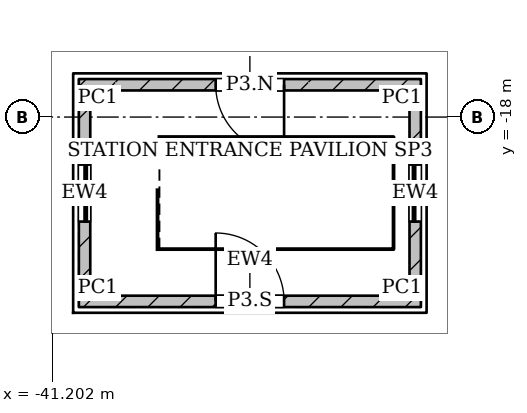
"""IFC4 building model, lengths in metres.
Left out: names, types, materials, properties, quantities, classifications, styles, units other than length and angle.
Written with IfcOpenShell. Run it as: python <this file> out.ifc"""

import sys

from ifc_helpers import new_model, si_unit, direction, frame, frame_2d, origin, origin_2d, place, context, subcontext, project, spatial, rectangle, extrude, element, fill, save


model = new_model("IFC4")
c1 = context("Model", 3, precision=1e-05, world=origin(), true_north=direction((0.0, 1.0)))
c2 = subcontext(c1, "Body", "Model", "MODEL_VIEW")
j1 = project(units=[si_unit("LENGTHUNIT", "METRE"), si_unit("PLANEANGLEUNIT", "RADIAN")], contexts=[c1])
p1 = place(None, origin())
s1 = spatial("IfcSite", under=j1, at=p1, CompositionType="ELEMENT")
p2 = place(p1, origin())
s2 = spatial("IfcBuilding", under=s1, at=p2, CompositionType="ELEMENT")
p3 = place(p2, origin())
s3 = spatial("IfcBuildingStorey", under=s2, at=p3, CompositionType="ELEMENT", Elevation=0.0)
p4 = place(p3, frame((-40.5, -22.85, 0.0), z_axis=(0.0, 0.0, 1.0), x_axis=(1.0, 0.0, 0.0)))
e1 = element("IfcWall", 1, at=p4, inside=s3, PredefinedType="SOLIDWALL", context=c2, shape_type="SweptSolid", body=[
    extrude(rectangle(XDim=9.0, YDim=0.3, at=frame_2d((4.5, 0.0))), origin(), (0.0, 0.0, 1.0), 4.2),
])
p5 = place(p4, frame((3.6, 0.0, 0.0)))
e2 = element("IfcOpeningElement", 2, at=p5, cuts=e1, PredefinedType="OPENING", context=c2, shape_type="SweptSolid", body=[
    extrude(rectangle(XDim=1.8, YDim=2.4, at=frame_2d((0.9, 1.2))), frame((0.0, 0.16, 0.0), z_axis=(0.0, -1.0, 0.0), x_axis=(1.0, 0.0, 0.0)), (0.0, 0.0, 1.0), 0.32),
])
p6 = place(p3, frame((-31.65, -22.7, 0.0), z_axis=(0.0, 0.0, 1.0), x_axis=(0.0, 1.0, 0.0)))
e3 = element("IfcWall", 3, at=p6, inside=s3, PredefinedType="SOLIDWALL", context=c2, shape_type="SweptSolid", body=[
    extrude(rectangle(XDim=5.4, YDim=0.3, at=frame_2d((2.7, 0.0))), origin(), (0.0, 0.0, 1.0), 4.2),
])
p7 = place(p6, frame((1.95, 0.0, 0.9)))
e4 = element("IfcOpeningElement", 4, at=p7, cuts=e3, PredefinedType="OPENING", context=c2, shape_type="SweptSolid", body=[
    extrude(rectangle(XDim=1.5, YDim=1.8, at=frame_2d((0.75, 0.9))), frame((0.0, 0.16, 0.0), z_axis=(0.0, -1.0, 0.0), x_axis=(1.0, 0.0, 0.0)), (0.0, 0.0, 1.0), 0.32),
])
p8 = place(p3, frame((-31.5, -17.15, 0.0), z_axis=(0.0, 0.0, 1.0), x_axis=(-1.0, 0.0, 0.0)))
e5 = element("IfcWall", 5, at=p8, inside=s3, PredefinedType="SOLIDWALL", context=c2, shape_type="SweptSolid", body=[
    extrude(rectangle(XDim=9.0, YDim=0.3, at=frame_2d((4.5, 0.0))), origin(), (0.0, 0.0, 1.0), 4.2),
])
p9 = place(p8, frame((3.6, 0.0, 0.0)))
e6 = element("IfcOpeningElement", 6, at=p9, cuts=e5, PredefinedType="OPENING", context=c2, shape_type="SweptSolid", body=[
    extrude(rectangle(XDim=1.8, YDim=2.4, at=frame_2d((0.9, 1.2))), frame((0.0, 0.16, 0.0), z_axis=(0.0, -1.0, 0.0), x_axis=(1.0, 0.0, 0.0)), (0.0, 0.0, 1.0), 0.32),
])
p10 = place(p3, frame((-40.35, -17.3, 0.0), z_axis=(0.0, 0.0, 1.0), x_axis=(0.0, -1.0, 0.0)))
e7 = element("IfcWall", 7, at=p10, inside=s3, PredefinedType="SOLIDWALL", context=c2, shape_type="SweptSolid", body=[
    extrude(rectangle(XDim=5.4, YDim=0.3, at=frame_2d((2.7, 0.0))), origin(), (0.0, 0.0, 1.0), 4.2),
])
p11 = place(p10, frame((1.95, 0.0, 0.9)))
e8 = element("IfcOpeningElement", 8, at=p11, cuts=e7, PredefinedType="OPENING", context=c2, shape_type="SweptSolid", body=[
    extrude(rectangle(XDim=1.5, YDim=1.8, at=frame_2d((0.75, 0.9))), frame((0.0, 0.16, 0.0), z_axis=(0.0, -1.0, 0.0), x_axis=(1.0, 0.0, 0.0)), (0.0, 0.0, 1.0), 0.32),
])
for number, where, z_axis, x_axis in (
    (9, (-40.0, -22.5, 0.0), (0.0, 0.0, 1.0), (1.0, 0.0, 0.0)),
    (10, (-32.0, -22.5, 0.0), (0.0, 0.0, 1.0), (1.0, 0.0, 0.0)),
    (11, (-32.0, -17.5, 0.0), (0.0, 0.0, 1.0), (1.0, 0.0, 0.0)),
    (12, (-40.0, -17.5, 0.0), (0.0, 0.0, 1.0), (1.0, 0.0, 0.0)),
):
    element("IfcColumn", number, at=place(p3, frame(where, z_axis=z_axis, x_axis=x_axis)), inside=s3, PredefinedType="COLUMN", context=c2, shape_type="SweptSolid", body=[
        extrude(rectangle(XDim=0.4, YDim=0.4, at=origin_2d()), origin(), (0.0, 0.0, 1.0), 4.2),
    ])
p12 = place(p5, origin())
e13 = element("IfcDoor", 13, at=p12, inside=s3, OperationType="DOUBLE_DOOR_DOUBLE_SWING", PredefinedType="DOOR", context=c2, shape_type="SweptSolid", body=[
    extrude(rectangle(XDim=1.8, YDim=2.4, at=frame_2d((0.9, 1.2))), frame((0.0, 0.025, 0.0), z_axis=(0.0, -1.0, 0.0), x_axis=(1.0, 0.0, 0.0)), (0.0, 0.0, 1.0), 0.05),
])
fill(e2, e13)
p13 = place(p7, origin())
e14 = element("IfcWindow", 14, at=p13, inside=s3, PartitioningType="SINGLE_PANEL", PredefinedType="WINDOW", context=c2, shape_type="SweptSolid", body=[
    extrude(rectangle(XDim=1.5, YDim=1.8, at=frame_2d((0.75, 0.9))), frame((0.0, 0.06, 0.0), z_axis=(0.0, -1.0, 0.0), x_axis=(1.0, 0.0, 0.0)), (0.0, 0.0, 1.0), 0.06),
])
fill(e4, e14)
p14 = place(p9, origin())
e15 = element("IfcDoor", 15, at=p14, inside=s3, OperationType="DOUBLE_DOOR_DOUBLE_SWING", PredefinedType="DOOR", context=c2, shape_type="SweptSolid", body=[
    extrude(rectangle(XDim=1.8, YDim=2.4, at=frame_2d((0.9, 1.2))), frame((0.0, 0.025, 0.0), z_axis=(0.0, -1.0, 0.0), x_axis=(1.0, 0.0, 0.0)), (0.0, 0.0, 1.0), 0.05),
])
fill(e6, e15)
p15 = place(p11, origin())
e16 = element("IfcWindow", 16, at=p15, inside=s3, PartitioningType="SINGLE_PANEL", PredefinedType="WINDOW", context=c2, shape_type="SweptSolid", body=[
    extrude(rectangle(XDim=1.5, YDim=1.8, at=frame_2d((0.75, 0.9))), frame((0.0, 0.06, 0.0), z_axis=(0.0, -1.0, 0.0), x_axis=(1.0, 0.0, 0.0)), (0.0, 0.0, 1.0), 0.06),
])
fill(e8, e16)
save(model, sys.argv[1])
